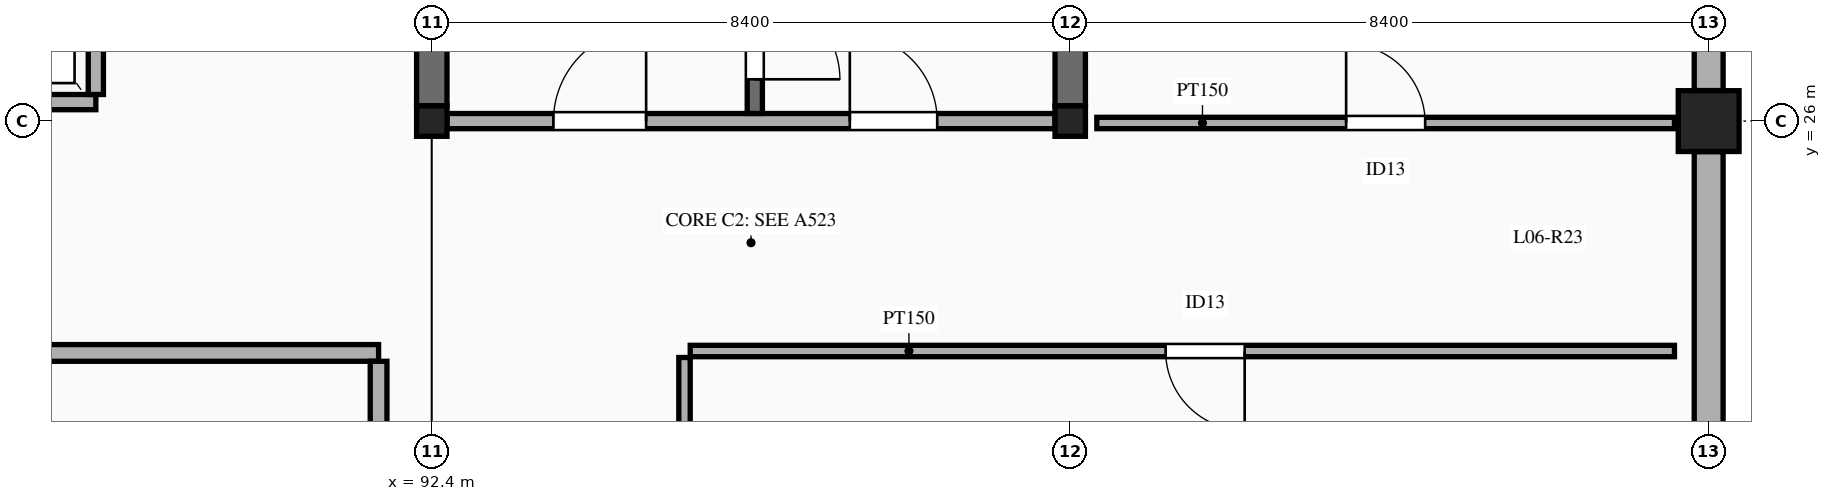
"""IFC4 building model, lengths in metres.
Left out: names, types, materials, properties, quantities, classifications, styles, units other than length and angle.
Written with IfcOpenShell. Run it as: python <this file> out.ifc"""

import sys

from ifc_helpers import new_model, si_unit, direction, frame, frame_2d, origin, origin_2d, place, context, subcontext, project, spatial, rectangle, extrude, element, fill, save


model = new_model("IFC4")
c1 = context("Model", 3, precision=1e-05, world=origin(), true_north=direction((0.0, 1.0)))
c2 = subcontext(c1, "Body", "Model", "MODEL_VIEW")
j1 = project(units=[si_unit("LENGTHUNIT", "METRE"), si_unit("PLANEANGLEUNIT", "RADIAN")], contexts=[c1])
p1 = place(None, origin())
s1 = spatial("IfcSite", under=j1, at=p1, CompositionType="ELEMENT")
p2 = place(p1, origin())
s2 = spatial("IfcBuilding", under=s1, at=p2, CompositionType="ELEMENT")
p3 = place(p2, frame((0.0, 0.0, 28.5)))
s3 = spatial("IfcBuildingStorey", under=s2, at=p3, CompositionType="ELEMENT", Elevation=28.5)
for number, where, z_axis, x_axis in (
    (1, (92.4, 26.0, 0.0), (0.0, 0.0, 1.0), (1.0, 0.0, 0.0)),
    (2, (100.8, 26.0, 0.0), (0.0, 0.0, 1.0), (1.0, 0.0, 0.0)),
):
    element("IfcColumn", number, at=place(p3, frame(where, z_axis=z_axis, x_axis=x_axis)), inside=s3, PredefinedType="COLUMN", context=c2, shape_type="SweptSolid", body=[
        extrude(rectangle(XDim=0.4, YDim=0.4, at=origin_2d()), origin(), (0.0, 0.0, 1.0), 4.5),
    ])
p4 = place(p3, frame((109.2, 26.0, 0.0), z_axis=(0.0, 0.0, 1.0), x_axis=(1.0, 0.0, 0.0)))
e3 = element("IfcColumn", 3, at=p4, inside=s3, PredefinedType="COLUMN", context=c2, shape_type="SweptSolid", body=[
    extrude(rectangle(XDim=0.8, YDim=0.8, at=origin_2d()), origin(), (0.0, 0.0, 1.0), 4.5),
])
for number, where, z_axis, x_axis in (
    (4, (92.4, 26.2, 0.0), (0.0, 0.0, 1.0), (0.0, 1.0, 0.0)),
    (5, (100.8, 26.2, 0.0), (0.0, 0.0, 1.0), (0.0, 1.0, 0.0)),
):
    element("IfcWall", number, at=place(p3, frame(where, z_axis=z_axis, x_axis=x_axis)), inside=s3, PredefinedType="SHEAR", context=c2, shape_type="SweptSolid", body=[
        extrude(rectangle(XDim=8.0, YDim=0.4, at=frame_2d((4.0, 0.0))), origin(), (0.0, 0.0, 1.0), 4.5),
    ])
for number, where, z_axis, x_axis in (
    (6, (109.2, 18.002, 0.0), (0.0, 0.0, 1.0), (0.0, 1.0, 0.0)),
    (7, (109.2, 26.402, 0.0), (0.0, 0.0, 1.0), (0.0, 1.0, 0.0)),
):
    element("IfcWall", number, at=place(p3, frame(where, z_axis=z_axis, x_axis=x_axis)), inside=s3, PredefinedType="SOLIDWALL", context=c2, shape_type="SweptSolid", body=[
        extrude(rectangle(XDim=7.596, YDim=0.38, at=frame_2d((3.798, 0.0))), origin(), (0.0, 0.0, 1.0), 3.55),
    ])
p5 = place(p3, frame((92.6, 26.0, 0.0), z_axis=(0.0, 0.0, 1.0), x_axis=(1.0, 0.0, 0.0)))
e8 = element("IfcWall", 8, at=p5, inside=s3, PredefinedType="SOLIDWALL", context=c2, shape_type="SweptSolid", body=[
    extrude(rectangle(XDim=8.0, YDim=0.2, at=frame_2d((4.0, 0.0))), origin(), (0.0, 0.0, 1.0), 3.78),
])
p6 = place(p5, frame((1.4, 0.0, 0.0)))
e9 = element("IfcOpeningElement", 9, at=p6, cuts=e8, PredefinedType="OPENING", context=c2, shape_type="SweptSolid", body=[
    extrude(rectangle(XDim=1.22, YDim=2.15, at=frame_2d((0.61, 1.075))), frame((0.0, 0.11, 0.0), z_axis=(0.0, -1.0, 0.0), x_axis=(1.0, 0.0, 0.0)), (0.0, 0.0, 1.0), 0.22),
])
p7 = place(p5, frame((5.3, 0.0, 0.0)))
e10 = element("IfcOpeningElement", 10, at=p7, cuts=e8, PredefinedType="OPENING", context=c2, shape_type="SweptSolid", body=[
    extrude(rectangle(XDim=1.15, YDim=2.15, at=frame_2d((0.575, 1.075))), frame((0.0, 0.11, 0.0), z_axis=(0.0, -1.0, 0.0), x_axis=(1.0, 0.0, 0.0)), (0.0, 0.0, 1.0), 0.22),
])
p8 = place(p3, frame((96.65, 26.1, 0.0), z_axis=(0.0, 0.0, 1.0), x_axis=(0.0, 1.0, 0.0)))
e11 = element("IfcWall", 11, at=p8, inside=s3, PredefinedType="SOLIDWALL", context=c2, shape_type="SweptSolid", body=[
    extrude(rectangle(XDim=8.1, YDim=0.2, at=frame_2d((4.05, 0.0))), origin(), (0.0, 0.0, 1.0), 4.3),
])
p9 = place(p8, frame((0.45, 0.0, 0.0)))
e12 = element("IfcOpeningElement", 12, at=p9, cuts=e11, PredefinedType="OPENING", context=c2, shape_type="SweptSolid", body=[
    extrude(rectangle(XDim=1.12, YDim=2.15, at=frame_2d((0.56, 1.075))), frame((0.0, 0.11, 0.0), z_axis=(0.0, -1.0, 0.0), x_axis=(1.0, 0.0, 0.0)), (0.0, 0.0, 1.0), 0.22),
])
p10 = place(p3, frame((85.62, 26.25, 0.0), z_axis=(0.0, 0.0, 1.0), x_axis=(1.0, 0.0, 0.0)))
e13 = element("IfcWall", 13, at=p10, inside=s3, PredefinedType="SOLIDWALL", context=c2, shape_type="SweptSolid", body=[
    extrude(rectangle(XDim=2.36, YDim=0.2, at=frame_2d((1.18, 0.0))), origin(), (0.0, 0.0, 1.0), 3.78),
])
p11 = place(p10, frame((0.605, 0.0, 0.0)))
e14 = element("IfcOpeningElement", 14, at=p11, cuts=e13, PredefinedType="OPENING", context=c2, shape_type="SweptSolid", body=[
    extrude(rectangle(XDim=1.15, YDim=2.2, at=frame_2d((0.575, 1.1))), frame((0.0, 0.11, 0.0), z_axis=(0.0, -1.0, 0.0), x_axis=(1.0, 0.0, 0.0)), (0.0, 0.0, 1.0), 0.22),
])
p12 = place(p3, frame((87.98, 26.35, 0.0), z_axis=(0.0, 0.0, 1.0), x_axis=(0.0, 1.0, 0.0)))
e15 = element("IfcWall", 15, at=p12, inside=s3, PredefinedType="SOLIDWALL", context=c2, shape_type="SweptSolid", body=[
    extrude(rectangle(XDim=2.9, YDim=0.2, at=frame_2d((1.45, 0.0))), origin(), (0.0, 0.0, 1.0), 3.98),
])
p13 = place(p3, frame((59.5, 22.95, 0.0), z_axis=(0.0, 0.0, 1.0), x_axis=(1.0, 0.0, 0.0)))
e16 = element("IfcWall", 16, at=p13, inside=s3, PredefinedType="SOLIDWALL", context=c2, shape_type="SweptSolid", body=[
    extrude(rectangle(XDim=32.2, YDim=0.22, at=frame_2d((16.1, 0.0))), origin(), (0.0, 0.0, 1.0), 3.45),
])
p14 = place(p13, frame((3.0, 0.0, 0.0)))
e17 = element("IfcOpeningElement", 17, at=p14, cuts=e16, PredefinedType="OPENING", context=c2, shape_type="SweptSolid", body=[
    extrude(rectangle(XDim=1.2, YDim=2.2, at=frame_2d((0.6, 1.1))), frame((0.0, 0.12, 0.0), z_axis=(0.0, -1.0, 0.0), x_axis=(1.0, 0.0, 0.0)), (0.0, 0.0, 1.0), 0.24),
])
p15 = place(p3, frame((91.7, 17.01, 0.0), z_axis=(0.0, 0.0, 1.0), x_axis=(0.0, 1.0, 0.0)))
e18 = element("IfcWall", 18, at=p15, inside=s3, PredefinedType="SOLIDWALL", context=c2, shape_type="SweptSolid", body=[
    extrude(rectangle(XDim=5.83, YDim=0.22, at=frame_2d((2.915, 0.0))), origin(), (0.0, 0.0, 1.0), 3.45),
])
p16 = place(p3, frame((101.15, 25.975, 0.0), z_axis=(0.0, 0.0, 1.0), x_axis=(1.0, 0.0, 0.0)))
e19 = element("IfcWall", 19, at=p16, inside=s3, PredefinedType="PARTITIONING", context=c2, shape_type="SweptSolid", body=[
    extrude(rectangle(XDim=7.6, YDim=0.15, at=frame_2d((3.8, 0.0))), origin(), (0.0, 0.0, 1.0), 3.45),
])
p17 = place(p16, frame((3.28, 0.0, 0.0)))
e20 = element("IfcOpeningElement", 20, at=p17, cuts=e19, PredefinedType="OPENING", context=c2, shape_type="SweptSolid", body=[
    extrude(rectangle(XDim=1.04, YDim=2.15, at=frame_2d((0.52, 1.075))), frame((0.0, 0.085, 0.0), z_axis=(0.0, -1.0, 0.0), x_axis=(1.0, 0.0, 0.0)), (0.0, 0.0, 1.0), 0.17),
])
p18 = place(p3, frame((95.8, 22.975, 0.0), z_axis=(0.0, 0.0, 1.0), x_axis=(1.0, 0.0, 0.0)))
e21 = element("IfcWall", 21, at=p18, inside=s3, PredefinedType="PARTITIONING", context=c2, shape_type="SweptSolid", body=[
    extrude(rectangle(XDim=12.95, YDim=0.15, at=frame_2d((6.475, 0.0))), origin(), (0.0, 0.0, 1.0), 3.45),
])
p19 = place(p18, frame((6.255, 0.0, 0.0)))
e22 = element("IfcOpeningElement", 22, at=p19, cuts=e21, PredefinedType="OPENING", context=c2, shape_type="SweptSolid", body=[
    extrude(rectangle(XDim=1.04, YDim=2.15, at=frame_2d((0.52, 1.075))), frame((0.0, 0.085, 0.0), z_axis=(0.0, -1.0, 0.0), x_axis=(1.0, 0.0, 0.0)), (0.0, 0.0, 1.0), 0.17),
])
p20 = place(p3, frame((95.725, 14.2, 0.0), z_axis=(0.0, 0.0, 1.0), x_axis=(0.0, 1.0, 0.0)))
e23 = element("IfcWall", 23, at=p20, inside=s3, PredefinedType="PARTITIONING", context=c2, shape_type="SweptSolid", body=[
    extrude(rectangle(XDim=8.69, YDim=0.15, at=frame_2d((4.345, 0.0))), origin(), (0.0, 0.0, 1.0), 3.45),
])
p21 = place(p6, origin())
e24 = element("IfcDoor", 24, at=p21, inside=s3, OperationType="SINGLE_SWING_RIGHT", PredefinedType="DOOR", context=c2, shape_type="SweptSolid", body=[
    extrude(rectangle(XDim=1.22, YDim=2.15, at=frame_2d((0.61, 1.075))), frame((0.0, 0.025, 0.0), z_axis=(0.0, -1.0, 0.0), x_axis=(1.0, 0.0, 0.0)), (0.0, 0.0, 1.0), 0.05),
])
fill(e9, e24)
p22 = place(p7, origin())
e25 = element("IfcDoor", 25, at=p22, inside=s3, OperationType="SINGLE_SWING_LEFT", PredefinedType="DOOR", context=c2, shape_type="SweptSolid", body=[
    extrude(rectangle(XDim=1.15, YDim=2.15, at=frame_2d((0.575, 1.075))), frame((0.0, 0.025, 0.0), z_axis=(0.0, -1.0, 0.0), x_axis=(1.0, 0.0, 0.0)), (0.0, 0.0, 1.0), 0.05),
])
fill(e10, e25)
p23 = place(p9, frame((1.12, 0.0, 0.0), z_axis=(0.0, 0.0, 1.0), x_axis=(-1.0, 0.0, 0.0)))
e26 = element("IfcDoor", 26, at=p23, inside=s3, OperationType="SINGLE_SWING_RIGHT", PredefinedType="DOOR", context=c2, shape_type="SweptSolid", body=[
    extrude(rectangle(XDim=1.12, YDim=2.15, at=frame_2d((0.56, 1.075))), frame((0.0, 0.025, 0.0), z_axis=(0.0, -1.0, 0.0), x_axis=(1.0, 0.0, 0.0)), (0.0, 0.0, 1.0), 0.05),
])
fill(e12, e26)
p24 = place(p17, origin())
e27 = element("IfcDoor", 27, at=p24, inside=s3, OperationType="SINGLE_SWING_LEFT", PredefinedType="DOOR", context=c2, shape_type="SweptSolid", body=[
    extrude(rectangle(XDim=1.04, YDim=2.15, at=frame_2d((0.52, 1.075))), frame((0.0, 0.025, 0.0), z_axis=(0.0, -1.0, 0.0), x_axis=(1.0, 0.0, 0.0)), (0.0, 0.0, 1.0), 0.05),
])
fill(e20, e27)
p25 = place(p19, frame((1.04, 0.0, 0.0), z_axis=(0.0, 0.0, 1.0), x_axis=(-1.0, 0.0, 0.0)))
e28 = element("IfcDoor", 28, at=p25, inside=s3, OperationType="SINGLE_SWING_LEFT", PredefinedType="DOOR", context=c2, shape_type="SweptSolid", body=[
    extrude(rectangle(XDim=1.04, YDim=2.15, at=frame_2d((0.52, 1.075))), frame((0.0, 0.025, 0.0), z_axis=(0.0, -1.0, 0.0), x_axis=(1.0, 0.0, 0.0)), (0.0, 0.0, 1.0), 0.05),
])
fill(e22, e28)
save(model, sys.argv[1])
